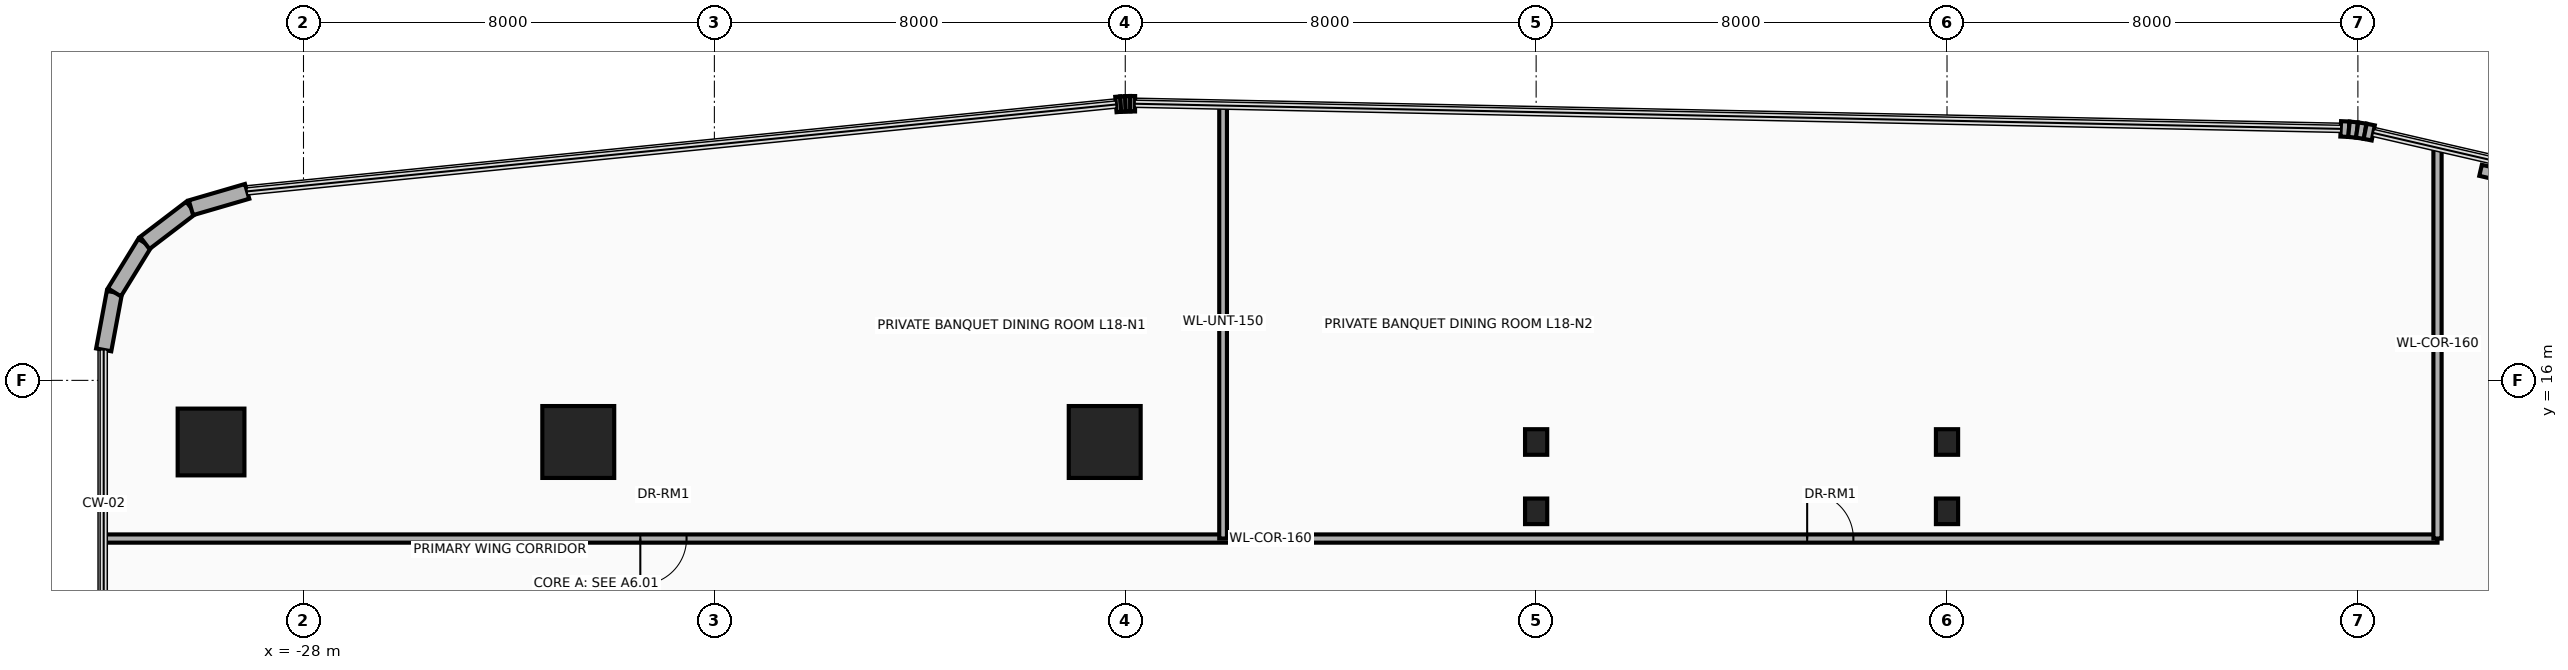
"""IFC4 building model, lengths in metres.
Left out: names, types, materials, properties, quantities, classifications, styles, units other than length and angle.
Written with IfcOpenShell. Run it as: python <this file> out.ifc"""

import sys

from ifc_helpers import new_model, si_unit, direction, frame, frame_2d, origin, origin_2d, place, context, subcontext, project, spatial, rectangle, circle, i_section, extrude, source, transform, mapped, element, fill, save


model = new_model("IFC4")
c1 = context("Model", 3, precision=1e-05, world=origin(), true_north=direction((0.0, 1.0)))
c2 = subcontext(c1, "Body", "Model", "MODEL_VIEW")
j1 = project(units=[si_unit("LENGTHUNIT", "METRE"), si_unit("PLANEANGLEUNIT", "RADIAN")], contexts=[c1])
p1 = place(None, origin())
s1 = spatial("IfcSite", under=j1, at=p1, CompositionType="ELEMENT")
p2 = place(p1, origin())
s2 = spatial("IfcBuilding", under=s1, at=p2, CompositionType="ELEMENT")
p3 = place(p2, frame((0.0, 0.0, 74.1)))
s3 = spatial("IfcBuildingStorey", under=s2, at=p3, CompositionType="ELEMENT", Elevation=74.1)
m1 = source(origin(), c2, "Body", "SweptSolid", [
    extrude(circle(Radius=0.65, at=origin_2d()), origin(), (0.0, 0.0, 1.0), 3.7),
])
p4 = place(p3, frame((-29.8, 14.8, 0.0), z_axis=(0.0, 0.0, 1.0), x_axis=(1.0, 0.0, 0.0)))
e1 = element("IfcColumn", 1, at=p4, inside=s3, PredefinedType="COLUMN", context=c2, shape_type="MappedRepresentation", body=[
    mapped(m1, transform((0.0, 0.0, 0.0), x_axis=(1.0, 0.0, 0.0), y_axis=(0.0, 1.0, 0.0), z_axis=(0.0, 0.0, 1.0), scale=1.0)),
])
m2 = source(origin(), c2, "Body", "SweptSolid", [
    extrude(rectangle(XDim=1.4, YDim=1.4, at=origin_2d()), origin(), (0.0, 0.0, 1.0), 3.7),
])
for number, where, z_axis, x_axis in (
    (2, (-22.65, 14.8, 0.0), (0.0, 0.0, 1.0), (1.0, 0.0, 0.0)),
    (3, (-12.4, 14.8, 0.0), (0.0, 0.0, 1.0), (1.0, 0.0, 0.0)),
):
    element("IfcColumn", number, at=place(p3, frame(where, z_axis=z_axis, x_axis=x_axis)), inside=s3, PredefinedType="COLUMN", context=c2, shape_type="MappedRepresentation", body=[
        mapped(m2, transform((0.0, 0.0, 0.0), x_axis=(1.0, 0.0, 0.0), y_axis=(0.0, 1.0, 0.0), z_axis=(0.0, 0.0, 1.0), scale=1.0)),
    ])
m3 = source(origin(), c2, "Body", "SweptSolid", [
    extrude(i_section(OverallWidth=0.432, OverallDepth=0.498, WebThickness=0.056, FlangeThickness=0.089, at=origin_2d()), origin(), (0.0, 0.0, 1.0), 3.7),
])
for number, where, z_axis, x_axis in (
    (4, (-4.0, 13.45, 0.0), (0.0, 0.0, 1.0), (1.0, 0.0, 0.0)),
    (5, (-4.0, 14.8, 0.0), (0.0, 0.0, 1.0), (1.0, 0.0, 0.0)),
    (6, (4.0, 13.45, 0.0), (0.0, 0.0, 1.0), (1.0, 0.0, 0.0)),
    (7, (4.0, 14.8, 0.0), (0.0, 0.0, 1.0), (1.0, 0.0, 0.0)),
):
    element("IfcColumn", number, at=place(p3, frame(where, z_axis=z_axis, x_axis=x_axis)), inside=s3, PredefinedType="COLUMN", context=c2, shape_type="MappedRepresentation", body=[
        mapped(m3, transform((0.0, 0.0, 0.0), x_axis=(1.0, 0.0, 0.0), y_axis=(0.0, 1.0, 0.0), z_axis=(0.0, 0.0, 1.0), scale=1.0)),
    ])
p5 = place(p3, frame((-31.89, 16.594, 0.0), z_axis=(0.0, 0.0, 1.0), x_axis=(0.182748995683, 0.9831596028, 0.0)))
e8 = element("IfcWall", 8, at=p5, inside=s3, PredefinedType="SOLIDWALL", context=c2, shape_type="SweptSolid", body=[
    extrude(rectangle(XDim=1.14, YDim=0.3, at=frame_2d((0.57, 0.0))), origin(), (0.0, 0.0, 1.0), 3.46),
])
p6 = place(p3, frame((-31.682, 17.714, 0.0), z_axis=(0.0, 0.0, 1.0), x_axis=(0.524157723014, 0.8516212077, 0.0)))
e9 = element("IfcWall", 9, at=p6, inside=s3, PredefinedType="SOLIDWALL", context=c2, shape_type="SweptSolid", body=[
    extrude(rectangle(XDim=1.129, YDim=0.3, at=frame_2d((0.565, 0.0))), origin(), (0.0, 0.0, 1.0), 3.46),
])
p7 = place(p3, frame((-31.09, 18.676, 0.0), z_axis=(0.0, 0.0, 1.0), x_axis=(0.795253002434, 0.606277710393, 0.0)))
e10 = element("IfcWall", 10, at=p7, inside=s3, PredefinedType="SOLIDWALL", context=c2, shape_type="SweptSolid", body=[
    extrude(rectangle(XDim=1.129, YDim=0.3, at=frame_2d((0.564, 0.0))), origin(), (0.0, 0.0, 1.0), 3.46),
])
p8 = place(p3, frame((-30.192, 19.361, 0.0), z_axis=(0.0, 0.0, 1.0), x_axis=(0.960071941549, 0.279753225271, 0.0)))
e11 = element("IfcWall", 11, at=p8, inside=s3, PredefinedType="SOLIDWALL", context=c2, shape_type="SweptSolid", body=[
    extrude(rectangle(XDim=1.14, YDim=0.3, at=frame_2d((0.57, 0.0))), origin(), (0.0, 0.0, 1.0), 3.46),
])
p9 = place(p3, frame((-12.182, 21.371, 0.0), z_axis=(0.0, 0.0, 1.0), x_axis=(0.996527790842, 0.08326080759, 0.0)))
e12 = element("IfcWall", 12, at=p9, inside=s3, PredefinedType="SOLIDWALL", context=c2, shape_type="SweptSolid", body=[
    extrude(rectangle(XDim=0.094, YDim=0.3, at=frame_2d((0.047, 0.0))), origin(), (0.0, 0.0, 1.0), 3.46),
])
p10 = place(p3, frame((-12.088, 21.379, 0.0), z_axis=(0.0, 0.0, 1.0), x_axis=(0.998476480444, 0.055178963393, 0.0)))
e13 = element("IfcWall", 13, at=p10, inside=s3, PredefinedType="SOLIDWALL", context=c2, shape_type="SweptSolid", body=[
    extrude(rectangle(XDim=0.093, YDim=0.3, at=frame_2d((0.046, 0.0))), origin(), (0.0, 0.0, 1.0), 3.46),
])
p11 = place(p3, frame((-11.996, 21.384, 0.0), z_axis=(0.0, 0.0, 1.0), x_axis=(0.999722573757, 0.023553673204, 0.0)))
e14 = element("IfcWall", 14, at=p11, inside=s3, PredefinedType="SOLIDWALL", context=c2, shape_type="SweptSolid", body=[
    extrude(rectangle(XDim=0.093, YDim=0.3, at=frame_2d((0.047, 0.0))), origin(), (0.0, 0.0, 1.0), 3.46),
])
p12 = place(p3, frame((-11.902, 21.386, 0.0), z_axis=(0.0, 0.0, 1.0), x_axis=(0.999986507273, -0.005194735103, 0.0)))
e15 = element("IfcWall", 15, at=p12, inside=s3, PredefinedType="SOLIDWALL", context=c2, shape_type="SweptSolid", body=[
    extrude(rectangle(XDim=0.094, YDim=0.3, at=frame_2d((0.047, 0.0))), origin(), (0.0, 0.0, 1.0), 3.46),
])
p13 = place(p3, frame((11.666, 20.897, 0.0), z_axis=(0.0, 0.0, 1.0), x_axis=(0.998885297239, -0.047203421059, 0.0)))
e16 = element("IfcWall", 16, at=p13, inside=s3, PredefinedType="SOLIDWALL", context=c2, shape_type="SweptSolid", body=[
    extrude(rectangle(XDim=0.16, YDim=0.3, at=frame_2d((0.08, 0.0))), origin(), (0.0, 0.0, 1.0), 3.46),
])
p14 = place(p3, frame((11.826, 20.889, 0.0), z_axis=(0.0, 0.0, 1.0), x_axis=(0.995172891136, -0.098137234257, 0.0)))
e17 = element("IfcWall", 17, at=p14, inside=s3, PredefinedType="SOLIDWALL", context=c2, shape_type="SweptSolid", body=[
    extrude(rectangle(XDim=0.159, YDim=0.3, at=frame_2d((0.08, 0.0))), origin(), (0.0, 0.0, 1.0), 3.46),
])
p15 = place(p3, frame((11.984, 20.874, 0.0), z_axis=(0.0, 0.0, 1.0), x_axis=(0.988846069207, -0.148941100486, 0.0)))
e18 = element("IfcWall", 18, at=p15, inside=s3, PredefinedType="SOLIDWALL", context=c2, shape_type="SweptSolid", body=[
    extrude(rectangle(XDim=0.159, YDim=0.3, at=frame_2d((0.08, 0.0))), origin(), (0.0, 0.0, 1.0), 3.46),
])
p16 = place(p3, frame((12.142, 20.85, 0.0), z_axis=(0.0, 0.0, 1.0), x_axis=(0.979991950448, -0.19903712482, 0.0)))
e19 = element("IfcWall", 19, at=p16, inside=s3, PredefinedType="SOLIDWALL", context=c2, shape_type="SweptSolid", body=[
    extrude(rectangle(XDim=0.161, YDim=0.3, at=frame_2d((0.08, 0.0))), origin(), (0.0, 0.0, 1.0), 3.46),
])
p17 = place(p3, frame((14.389, 20.09, 0.0), z_axis=(0.0, 0.0, 1.0), x_axis=(0.974400545997, -0.224818984875, 0.0)))
e20 = element("IfcWall", 20, at=p17, inside=s3, PredefinedType="SOLIDWALL", context=c2, shape_type="SweptSolid", body=[
    extrude(rectangle(XDim=2.2, YDim=0.22, at=frame_2d((1.1, 0.0))), origin(), (0.0, 0.0, 1.0), 3.46),
])
p18 = place(p17, frame((0.65, 0.0, 0.95)))
e21 = element("IfcOpeningElement", 21, at=p18, cuts=e20, PredefinedType="OPENING", context=c2, shape_type="SweptSolid", body=[
    extrude(rectangle(XDim=0.9, YDim=1.3, at=frame_2d((0.45, 0.65))), frame((0.0, 0.125, 0.0), z_axis=(0.0, -1.0, 0.0), x_axis=(1.0, 0.0, 0.0)), (0.0, 0.0, 1.0), 0.25),
])
p19 = place(p3, frame((-31.89, 12.92, 0.0), z_axis=(0.0, 0.0, 1.0), x_axis=(1.0, 0.0, 0.0)))
e22 = element("IfcWall", 22, at=p19, inside=s3, PredefinedType="PARTITIONING", context=c2, shape_type="SweptSolid", body=[
    extrude(rectangle(XDim=45.44, YDim=0.16, at=frame_2d((22.72, 0.0))), origin(), (0.0, 0.0, 1.0), 2.583),
])
p20 = place(p19, frame((10.448, 0.0, 0.0)))
e23 = element("IfcOpeningElement", 23, at=p20, cuts=e22, PredefinedType="OPENING", context=c2, shape_type="SweptSolid", body=[
    extrude(rectangle(XDim=0.9, YDim=2.1, at=frame_2d((0.45, 1.05))), frame((0.0, 0.095, 0.0), z_axis=(0.0, -1.0, 0.0), x_axis=(1.0, 0.0, 0.0)), (0.0, 0.0, 1.0), 0.19),
])
p21 = place(p19, frame((33.167, 0.0, 0.0)))
e24 = element("IfcOpeningElement", 24, at=p21, cuts=e22, PredefinedType="OPENING", context=c2, shape_type="SweptSolid", body=[
    extrude(rectangle(XDim=0.9, YDim=2.1, at=frame_2d((0.45, 1.05))), frame((0.0, 0.095, 0.0), z_axis=(0.0, -1.0, 0.0), x_axis=(1.0, 0.0, 0.0)), (0.0, 0.0, 1.0), 0.19),
])
p22 = place(p3, frame((13.55, 12.92, 0.0), z_axis=(0.0, 0.0, 1.0), x_axis=(0.0, 1.0, 0.0)))
e25 = element("IfcWall", 25, at=p22, inside=s3, PredefinedType="PARTITIONING", context=c2, shape_type="SweptSolid", body=[
    extrude(rectangle(XDim=7.609, YDim=0.16, at=frame_2d((3.805, 0.0))), origin(), (0.0, 0.0, 1.0), 2.583),
])
p23 = place(p3, frame((-10.095, 12.92, 0.0), z_axis=(0.0, 0.0, 1.0), x_axis=(0.0, 1.0, 0.0)))
e26 = element("IfcWall", 26, at=p23, inside=s3, PredefinedType="PARTITIONING", context=c2, shape_type="SweptSolid", body=[
    extrude(rectangle(XDim=8.43, YDim=0.15, at=frame_2d((4.215, 0.0))), origin(), (0.0, 0.0, 1.0), 2.583),
])
p24 = place(p20, frame((0.9, 0.0, 0.0), z_axis=(0.0, 0.0, 1.0), x_axis=(-1.0, 0.0, 0.0)))
e27 = element("IfcDoor", 27, at=p24, inside=s3, OperationType="SINGLE_SWING_LEFT", PredefinedType="DOOR", context=c2, shape_type="SweptSolid", body=[
    extrude(rectangle(XDim=0.9, YDim=2.1, at=frame_2d((0.45, 1.05))), frame((0.0, 0.025, 0.0), z_axis=(0.0, -1.0, 0.0), x_axis=(1.0, 0.0, 0.0)), (0.0, 0.0, 1.0), 0.05),
])
fill(e23, e27)
p25 = place(p21, origin())
e28 = element("IfcDoor", 28, at=p25, inside=s3, OperationType="SINGLE_SWING_RIGHT", PredefinedType="DOOR", context=c2, shape_type="SweptSolid", body=[
    extrude(rectangle(XDim=0.9, YDim=2.1, at=frame_2d((0.45, 1.05))), frame((0.0, 0.025, 0.0), z_axis=(0.0, -1.0, 0.0), x_axis=(1.0, 0.0, 0.0)), (0.0, 0.0, 1.0), 0.05),
])
fill(e24, e28)
save(model, sys.argv[1])
